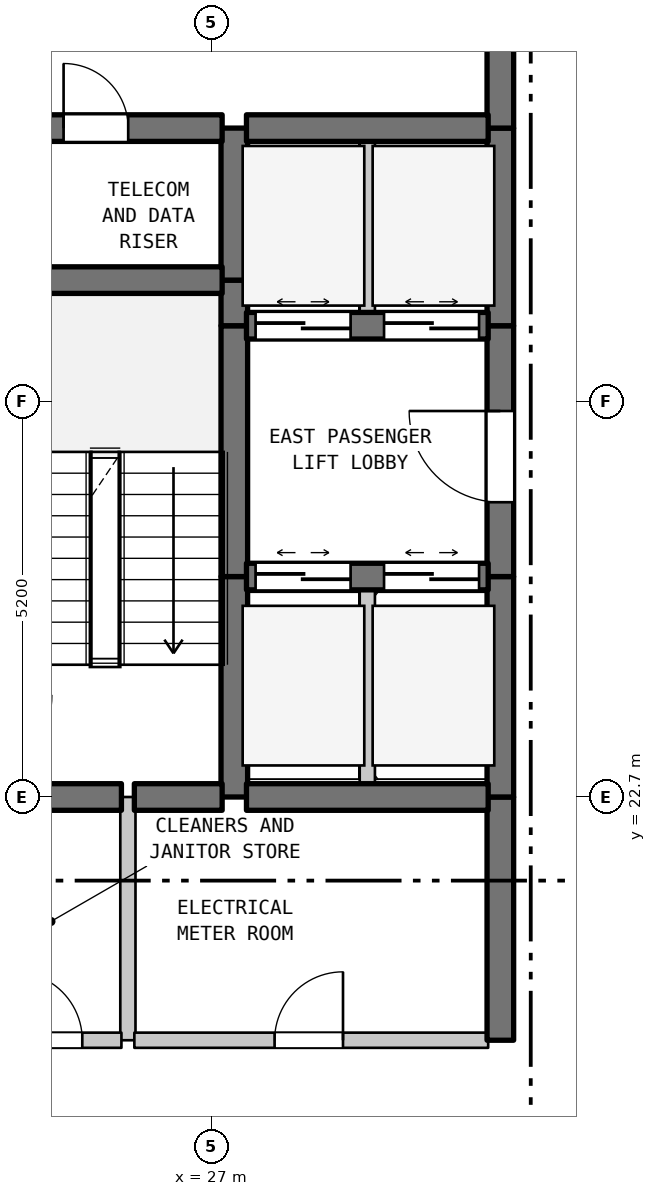
"""IFC4 building model, lengths in metres.
Left out: names, types, materials, properties, quantities, classifications, styles, units other than length and angle.
Written with IfcOpenShell. Run it as: python <this file> out.ifc"""

import sys

from ifc_helpers import new_model, si_unit, direction, frame, frame_2d, origin, place, context, subcontext, project, spatial, rectangle, extrude, element, fill, save


model = new_model("IFC4")
c1 = context("Model", 3, precision=1e-05, world=origin(), true_north=direction((0.0, 1.0)))
c2 = subcontext(c1, "Body", "Model", "MODEL_VIEW")
j1 = project(units=[si_unit("LENGTHUNIT", "METRE"), si_unit("PLANEANGLEUNIT", "RADIAN")], contexts=[c1])
p1 = place(None, origin())
s1 = spatial("IfcSite", under=j1, at=p1, CompositionType="ELEMENT")
p2 = place(p1, origin())
s2 = spatial("IfcBuilding", under=s1, at=p2, CompositionType="ELEMENT")
p3 = place(p2, frame((0.0, 0.0, 210.6)))
s3 = spatial("IfcBuildingStorey", under=s2, at=p3, CompositionType="ELEMENT", Elevation=210.6)
p4 = place(p3, frame((25.9, 19.5, 0.0), z_axis=(0.0, 0.0, 1.0), x_axis=(0.0, 1.0, 0.0)))
e1 = element("IfcWall", 1, at=p4, inside=s3, PredefinedType="STANDARD", context=c2, shape_type="SweptSolid", body=[
    extrude(rectangle(XDim=3.2, YDim=0.2, at=frame_2d((1.6, 0.0))), origin(), (0.0, 0.0, 1.0), 3.39),
])
p5 = place(p3, frame((27.3, 22.7, 0.0), z_axis=(0.0, 0.0, 1.0), x_axis=(0.0, 1.0, 0.0)))
e2 = element("IfcWall", 2, at=p5, inside=s3, PredefinedType="SHEAR", context=c2, shape_type="SweptSolid", body=[
    extrude(rectangle(XDim=2.9, YDim=0.35, at=frame_2d((1.45, 0.0))), origin(), (0.0, 0.0, 1.0), 3.39),
])
p6 = place(p3, frame((27.3, 25.6, 0.0), z_axis=(0.0, 0.0, 1.0), x_axis=(0.0, 1.0, 0.0)))
e3 = element("IfcWall", 3, at=p6, inside=s3, PredefinedType="SHEAR", context=c2, shape_type="SweptSolid", body=[
    extrude(rectangle(XDim=3.3, YDim=0.35, at=frame_2d((1.65, 0.0))), origin(), (0.0, 0.0, 1.0), 3.39),
])
p7 = place(p3, frame((27.3, 28.9, 0.0), z_axis=(0.0, 0.0, 1.0), x_axis=(0.0, 1.0, 0.0)))
e4 = element("IfcWall", 4, at=p7, inside=s3, PredefinedType="SHEAR", context=c2, shape_type="SweptSolid", body=[
    extrude(rectangle(XDim=0.6, YDim=0.35, at=frame_2d((0.3, 0.0))), origin(), (0.0, 0.0, 1.0), 3.39),
])
p8 = place(p3, frame((27.3, 29.5, 0.0), z_axis=(0.0, 0.0, 1.0), x_axis=(0.0, 1.0, 0.0)))
e5 = element("IfcWall", 5, at=p8, inside=s3, PredefinedType="SHEAR", context=c2, shape_type="SweptSolid", body=[
    extrude(rectangle(XDim=2.0, YDim=0.35, at=frame_2d((1.0, 0.0))), origin(), (0.0, 0.0, 1.0), 3.39),
])
p9 = place(p3, frame((29.05, 22.7, 0.0), z_axis=(0.0, 0.0, 1.0), x_axis=(0.0, 1.0, 0.0)))
e6 = element("IfcWall", 6, at=p9, inside=s3, PredefinedType="STANDARD", context=c2, shape_type="SweptSolid", body=[
    extrude(rectangle(XDim=2.9, YDim=0.2, at=frame_2d((1.45, 0.0))), origin(), (0.0, 0.0, 1.0), 3.39),
])
p10 = place(p3, frame((29.05, 28.9, 0.0), z_axis=(0.0, 0.0, 1.0), x_axis=(0.0, 1.0, 0.0)))
e7 = element("IfcWall", 7, at=p10, inside=s3, PredefinedType="STANDARD", context=c2, shape_type="SweptSolid", body=[
    extrude(rectangle(XDim=2.6, YDim=0.2, at=frame_2d((1.3, 0.0))), origin(), (0.0, 0.0, 1.0), 3.39),
])
p11 = place(p3, frame((30.8, 19.5, 0.0), z_axis=(0.0, 0.0, 1.0), x_axis=(0.0, 1.0, 0.0)))
e8 = element("IfcWall", 8, at=p11, inside=s3, PredefinedType="SHEAR", context=c2, shape_type="SweptSolid", body=[
    extrude(rectangle(XDim=3.2, YDim=0.35, at=frame_2d((1.6, 0.0))), origin(), (0.0, 0.0, 1.0), 3.39),
])
p12 = place(p3, frame((30.8, 22.7, 0.0), z_axis=(0.0, 0.0, 1.0), x_axis=(0.0, 1.0, 0.0)))
e9 = element("IfcWall", 9, at=p12, inside=s3, PredefinedType="SHEAR", context=c2, shape_type="SweptSolid", body=[
    extrude(rectangle(XDim=2.9, YDim=0.35, at=frame_2d((1.45, 0.0))), origin(), (0.0, 0.0, 1.0), 3.39),
])
p13 = place(p3, frame((30.8, 25.6, 0.0), z_axis=(0.0, 0.0, 1.0), x_axis=(0.0, 1.0, 0.0)))
e10 = element("IfcWall", 10, at=p13, inside=s3, PredefinedType="SHEAR", context=c2, shape_type="SweptSolid", body=[
    extrude(rectangle(XDim=3.3, YDim=0.35, at=frame_2d((1.65, 0.0))), origin(), (0.0, 0.0, 1.0), 3.39),
])
p14 = place(p13, frame((0.978, 0.0, 0.0)))
e11 = element("IfcOpeningElement", 11, at=p14, cuts=e10, PredefinedType="OPENING", context=c2, shape_type="SweptSolid", body=[
    extrude(rectangle(XDim=1.2, YDim=2.2, at=frame_2d((0.6, 1.1))), frame((0.0, 0.185, 0.0), z_axis=(0.0, -1.0, 0.0), x_axis=(1.0, 0.0, 0.0)), (0.0, 0.0, 1.0), 0.37),
])
p15 = place(p3, frame((30.8, 28.9, 0.0), z_axis=(0.0, 0.0, 1.0), x_axis=(0.0, 1.0, 0.0)))
e12 = element("IfcWall", 12, at=p15, inside=s3, PredefinedType="SHEAR", context=c2, shape_type="SweptSolid", body=[
    extrude(rectangle(XDim=2.6, YDim=0.35, at=frame_2d((1.3, 0.0))), origin(), (0.0, 0.0, 1.0), 3.39),
])
p16 = place(p3, frame((30.8, 31.5, 0.0), z_axis=(0.0, 0.0, 1.0), x_axis=(0.0, 1.0, 0.0)))
e13 = element("IfcWall", 13, at=p16, inside=s3, PredefinedType="SHEAR", context=c2, shape_type="SweptSolid", body=[
    extrude(rectangle(XDim=3.5, YDim=0.35, at=frame_2d((1.75, 0.0))), origin(), (0.0, 0.0, 1.0), 3.39),
])
p17 = place(p16, frame((1.15, 0.0, 0.0)))
e14 = element("IfcOpeningElement", 14, at=p17, cuts=e13, PredefinedType="OPENING", context=c2, shape_type="SweptSolid", body=[
    extrude(rectangle(XDim=1.2, YDim=2.2, at=frame_2d((0.6, 1.1))), frame((0.0, 0.185, 0.0), z_axis=(0.0, -1.0, 0.0), x_axis=(1.0, 0.0, 0.0)), (0.0, 0.0, 1.0), 0.37),
])
p18 = place(p3, frame((23.96, 19.5, 0.0), z_axis=(0.0, 0.0, 1.0), x_axis=(1.0, 0.0, 0.0)))
e15 = element("IfcWall", 15, at=p18, inside=s3, PredefinedType="STANDARD", context=c2, shape_type="SweptSolid", body=[
    extrude(rectangle(XDim=1.855, YDim=0.2, at=frame_2d((0.927, 0.0))), origin(), (0.0, 0.0, 1.0), 3.39),
])
p19 = place(p18, frame((0.44, 0.0, 0.0)))
e16 = element("IfcOpeningElement", 16, at=p19, cuts=e15, PredefinedType="OPENING", context=c2, shape_type="SweptSolid", body=[
    extrude(rectangle(XDim=0.9, YDim=2.15, at=frame_2d((0.45, 1.075))), frame((0.0, 0.11, 0.0), z_axis=(0.0, -1.0, 0.0), x_axis=(1.0, 0.0, 0.0)), (0.0, 0.0, 1.0), 0.22),
])
p20 = place(p3, frame((25.985, 19.5, 0.0), z_axis=(0.0, 0.0, 1.0), x_axis=(1.0, 0.0, 0.0)))
e17 = element("IfcWall", 17, at=p20, inside=s3, PredefinedType="STANDARD", context=c2, shape_type="SweptSolid", body=[
    extrude(rectangle(XDim=4.655, YDim=0.2, at=frame_2d((2.327, 0.0))), origin(), (0.0, 0.0, 1.0), 3.39),
])
p21 = place(p20, frame((1.845, 0.0, 0.0)))
e18 = element("IfcOpeningElement", 18, at=p21, cuts=e17, PredefinedType="OPENING", context=c2, shape_type="SweptSolid", body=[
    extrude(rectangle(XDim=0.9, YDim=2.15, at=frame_2d((0.45, 1.075))), frame((0.0, 0.11, 0.0), z_axis=(0.0, -1.0, 0.0), x_axis=(1.0, 0.0, 0.0)), (0.0, 0.0, 1.0), 0.22),
])
p22 = place(p3, frame((23.96, 22.7, 0.0), z_axis=(0.0, 0.0, 1.0), x_axis=(1.0, 0.0, 0.0)))
e19 = element("IfcWall", 19, at=p22, inside=s3, PredefinedType="SHEAR", context=c2, shape_type="SweptSolid", body=[
    extrude(rectangle(XDim=1.855, YDim=0.35, at=frame_2d((0.927, 0.0))), origin(), (0.0, 0.0, 1.0), 3.39),
])
p23 = place(p3, frame((25.985, 22.7, 0.0), z_axis=(0.0, 0.0, 1.0), x_axis=(1.0, 0.0, 0.0)))
e20 = element("IfcWall", 20, at=p23, inside=s3, PredefinedType="SHEAR", context=c2, shape_type="SweptSolid", body=[
    extrude(rectangle(XDim=1.155, YDim=0.35, at=frame_2d((0.577, 0.0))), origin(), (0.0, 0.0, 1.0), 3.39),
])
p24 = place(p3, frame((27.46, 22.7, 0.0), z_axis=(0.0, 0.0, 1.0), x_axis=(1.0, 0.0, 0.0)))
e21 = element("IfcWall", 21, at=p24, inside=s3, PredefinedType="SHEAR", context=c2, shape_type="SweptSolid", body=[
    extrude(rectangle(XDim=3.18, YDim=0.35, at=frame_2d((1.59, 0.0))), origin(), (0.0, 0.0, 1.0), 3.39),
])
p25 = place(p3, frame((27.46, 25.6, 0.0), z_axis=(0.0, 0.0, 1.0), x_axis=(1.0, 0.0, 0.0)))
e22 = element("IfcWall", 22, at=p25, inside=s3, PredefinedType="SHEAR", context=c2, shape_type="SweptSolid", body=[
    extrude(rectangle(XDim=3.18, YDim=0.35, at=frame_2d((1.59, 0.0))), origin(), (0.0, 0.0, 1.0), 3.39),
])
p26 = place(p25, frame((0.12, 0.0, 0.0)))
e23 = element("IfcOpeningElement", 23, at=p26, cuts=e22, PredefinedType="OPENING", context=c2, shape_type="SweptSolid", body=[
    extrude(rectangle(XDim=1.25, YDim=2.2, at=frame_2d((0.625, 1.1))), frame((0.0, 0.185, 0.0), z_axis=(0.0, -1.0, 0.0), x_axis=(1.0, 0.0, 0.0)), (0.0, 0.0, 1.0), 0.37),
])
p27 = place(p25, frame((1.81, 0.0, 0.0)))
e24 = element("IfcOpeningElement", 24, at=p27, cuts=e22, PredefinedType="OPENING", context=c2, shape_type="SweptSolid", body=[
    extrude(rectangle(XDim=1.25, YDim=2.2, at=frame_2d((0.625, 1.1))), frame((0.0, 0.185, 0.0), z_axis=(0.0, -1.0, 0.0), x_axis=(1.0, 0.0, 0.0)), (0.0, 0.0, 1.0), 0.37),
])
p28 = place(p3, frame((27.46, 28.9, 0.0), z_axis=(0.0, 0.0, 1.0), x_axis=(1.0, 0.0, 0.0)))
e25 = element("IfcWall", 25, at=p28, inside=s3, PredefinedType="SHEAR", context=c2, shape_type="SweptSolid", body=[
    extrude(rectangle(XDim=3.18, YDim=0.35, at=frame_2d((1.59, 0.0))), origin(), (0.0, 0.0, 1.0), 3.39),
])
p29 = place(p28, frame((0.12, 0.0, 0.0)))
e26 = element("IfcOpeningElement", 26, at=p29, cuts=e25, PredefinedType="OPENING", context=c2, shape_type="SweptSolid", body=[
    extrude(rectangle(XDim=1.25, YDim=2.2, at=frame_2d((0.625, 1.1))), frame((0.0, 0.185, 0.0), z_axis=(0.0, -1.0, 0.0), x_axis=(1.0, 0.0, 0.0)), (0.0, 0.0, 1.0), 0.37),
])
p30 = place(p28, frame((1.81, 0.0, 0.0)))
e27 = element("IfcOpeningElement", 27, at=p30, cuts=e25, PredefinedType="OPENING", context=c2, shape_type="SweptSolid", body=[
    extrude(rectangle(XDim=1.25, YDim=2.2, at=frame_2d((0.625, 1.1))), frame((0.0, 0.185, 0.0), z_axis=(0.0, -1.0, 0.0), x_axis=(1.0, 0.0, 0.0)), (0.0, 0.0, 1.0), 0.37),
])
p31 = place(p3, frame((23.96, 29.5, 0.0), z_axis=(0.0, 0.0, 1.0), x_axis=(1.0, 0.0, 0.0)))
e28 = element("IfcWall", 28, at=p31, inside=s3, PredefinedType="SHEAR", context=c2, shape_type="SweptSolid", body=[
    extrude(rectangle(XDim=3.18, YDim=0.35, at=frame_2d((1.59, 0.0))), origin(), (0.0, 0.0, 1.0), 3.39),
])
p32 = place(p3, frame((23.96, 31.5, 0.0), z_axis=(0.0, 0.0, 1.0), x_axis=(1.0, 0.0, 0.0)))
e29 = element("IfcWall", 29, at=p32, inside=s3, PredefinedType="SHEAR", context=c2, shape_type="SweptSolid", body=[
    extrude(rectangle(XDim=3.18, YDim=0.35, at=frame_2d((1.59, 0.0))), origin(), (0.0, 0.0, 1.0), 3.39),
])
p33 = place(p32, frame((1.094, 0.0, 0.0)))
e30 = element("IfcOpeningElement", 30, at=p33, cuts=e29, PredefinedType="OPENING", context=c2, shape_type="SweptSolid", body=[
    extrude(rectangle(XDim=0.85, YDim=2.1, at=frame_2d((0.425, 1.05))), frame((0.0, 0.185, 0.0), z_axis=(0.0, -1.0, 0.0), x_axis=(1.0, 0.0, 0.0)), (0.0, 0.0, 1.0), 0.37),
])
p34 = place(p3, frame((27.46, 31.5, 0.0), z_axis=(0.0, 0.0, 1.0), x_axis=(1.0, 0.0, 0.0)))
e31 = element("IfcWall", 31, at=p34, inside=s3, PredefinedType="SHEAR", context=c2, shape_type="SweptSolid", body=[
    extrude(rectangle(XDim=3.18, YDim=0.35, at=frame_2d((1.59, 0.0))), origin(), (0.0, 0.0, 1.0), 3.39),
])
p35 = place(p14, origin())
e32 = element("IfcDoor", 32, at=p35, inside=s3, OperationType="SINGLE_SWING_RIGHT", PredefinedType="DOOR", context=c2, shape_type="SweptSolid", body=[
    extrude(rectangle(XDim=1.2, YDim=2.2, at=frame_2d((0.6, 1.1))), frame((0.0, 0.025, 0.0), z_axis=(0.0, -1.0, 0.0), x_axis=(1.0, 0.0, 0.0)), (0.0, 0.0, 1.0), 0.05),
])
fill(e11, e32)
p36 = place(p19, origin())
e33 = element("IfcDoor", 33, at=p36, inside=s3, OperationType="SINGLE_SWING_LEFT", PredefinedType="DOOR", context=c2, shape_type="SweptSolid", body=[
    extrude(rectangle(XDim=0.9, YDim=2.15, at=frame_2d((0.45, 1.075))), frame((0.0, 0.025, 0.0), z_axis=(0.0, -1.0, 0.0), x_axis=(1.0, 0.0, 0.0)), (0.0, 0.0, 1.0), 0.05),
])
fill(e16, e33)
p37 = place(p21, origin())
e34 = element("IfcDoor", 34, at=p37, inside=s3, OperationType="SINGLE_SWING_RIGHT", PredefinedType="DOOR", context=c2, shape_type="SweptSolid", body=[
    extrude(rectangle(XDim=0.9, YDim=2.15, at=frame_2d((0.45, 1.075))), frame((0.0, 0.025, 0.0), z_axis=(0.0, -1.0, 0.0), x_axis=(1.0, 0.0, 0.0)), (0.0, 0.0, 1.0), 0.05),
])
fill(e18, e34)
p38 = place(p26, origin())
e35 = element("IfcDoor", 35, at=p38, inside=s3, OperationType="DOUBLE_DOOR_SLIDING", PredefinedType="DOOR", context=c2, shape_type="SweptSolid", body=[
    extrude(rectangle(XDim=1.25, YDim=2.2, at=frame_2d((0.625, 1.1))), frame((0.0, 0.025, 0.0), z_axis=(0.0, -1.0, 0.0), x_axis=(1.0, 0.0, 0.0)), (0.0, 0.0, 1.0), 0.05),
])
fill(e23, e35)
p39 = place(p27, origin())
e36 = element("IfcDoor", 36, at=p39, inside=s3, OperationType="DOUBLE_DOOR_SLIDING", PredefinedType="DOOR", context=c2, shape_type="SweptSolid", body=[
    extrude(rectangle(XDim=1.25, YDim=2.2, at=frame_2d((0.625, 1.1))), frame((0.0, 0.025, 0.0), z_axis=(0.0, -1.0, 0.0), x_axis=(1.0, 0.0, 0.0)), (0.0, 0.0, 1.0), 0.05),
])
fill(e24, e36)
p40 = place(p29, origin())
e37 = element("IfcDoor", 37, at=p40, inside=s3, OperationType="DOUBLE_DOOR_SLIDING", PredefinedType="DOOR", context=c2, shape_type="SweptSolid", body=[
    extrude(rectangle(XDim=1.25, YDim=2.2, at=frame_2d((0.625, 1.1))), frame((0.0, 0.025, 0.0), z_axis=(0.0, -1.0, 0.0), x_axis=(1.0, 0.0, 0.0)), (0.0, 0.0, 1.0), 0.05),
])
fill(e26, e37)
p41 = place(p30, origin())
e38 = element("IfcDoor", 38, at=p41, inside=s3, OperationType="DOUBLE_DOOR_SLIDING", PredefinedType="DOOR", context=c2, shape_type="SweptSolid", body=[
    extrude(rectangle(XDim=1.25, YDim=2.2, at=frame_2d((0.625, 1.1))), frame((0.0, 0.025, 0.0), z_axis=(0.0, -1.0, 0.0), x_axis=(1.0, 0.0, 0.0)), (0.0, 0.0, 1.0), 0.05),
])
fill(e27, e38)
p42 = place(p33, origin())
e39 = element("IfcDoor", 39, at=p42, inside=s3, OperationType="SINGLE_SWING_LEFT", PredefinedType="DOOR", context=c2, shape_type="SweptSolid", body=[
    extrude(rectangle(XDim=0.85, YDim=2.1, at=frame_2d((0.425, 1.05))), frame((0.0, 0.025, 0.0), z_axis=(0.0, -1.0, 0.0), x_axis=(1.0, 0.0, 0.0)), (0.0, 0.0, 1.0), 0.05),
])
fill(e30, e39)
save(model, sys.argv[1])
